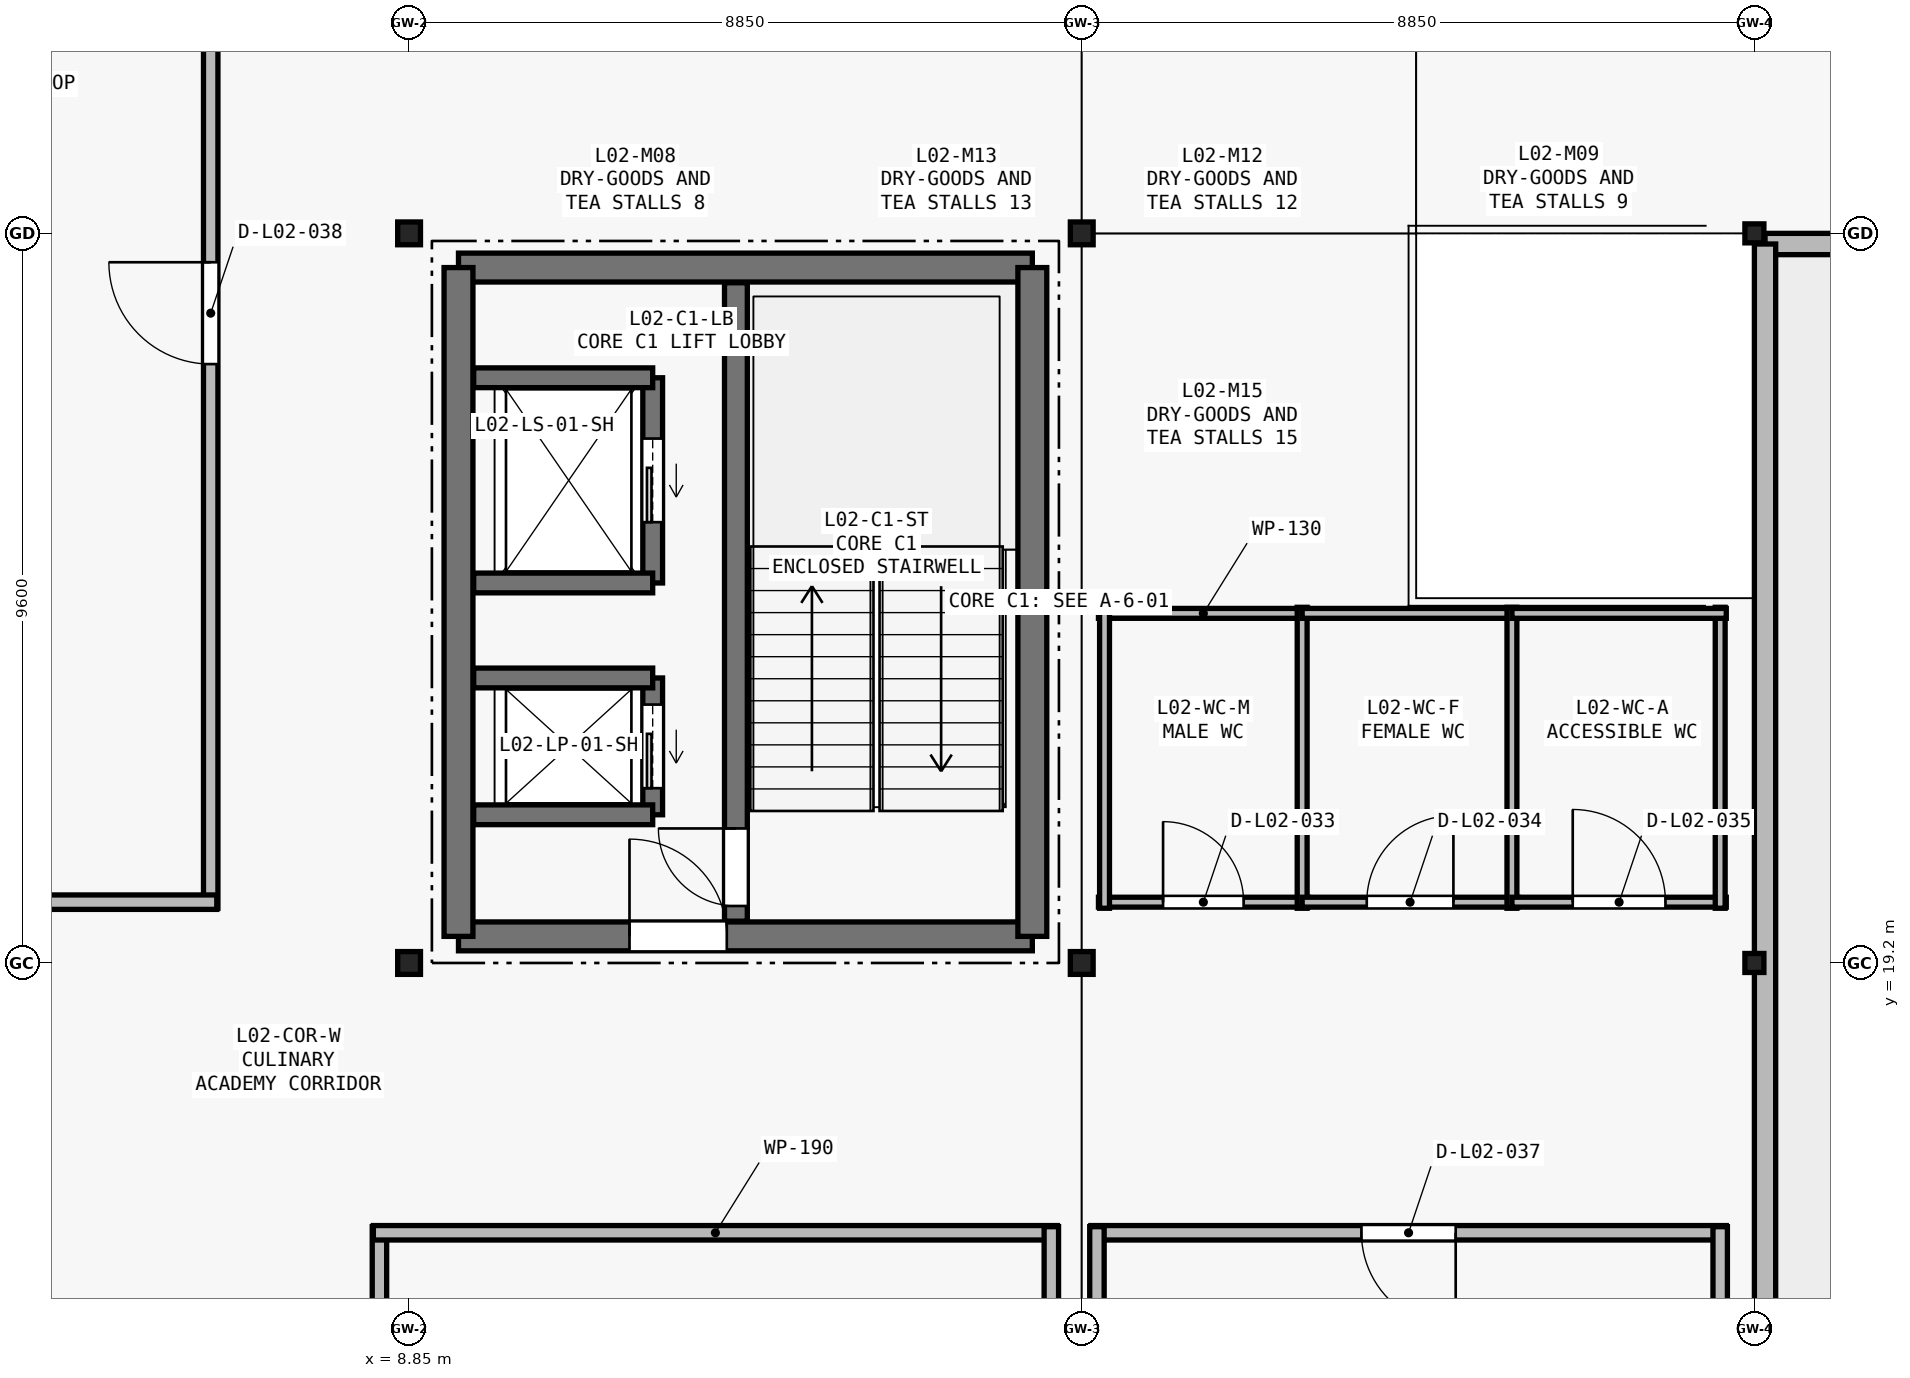
"""IFC4 building model, lengths in metres.
Left out: names, types, materials, properties, quantities, classifications, styles, units other than length and angle.
Written with IfcOpenShell. Run it as: python <this file> out.ifc"""

import sys

from ifc_helpers import new_model, si_unit, direction, frame, frame_2d, origin, origin_2d, place, context, subcontext, project, spatial, rectangle, i_section, extrude, element, fill, save


model = new_model("IFC4")
c1 = context("Model", 3, precision=1e-05, world=origin(), true_north=direction((0.0, 1.0)))
c2 = subcontext(c1, "Body", "Model", "MODEL_VIEW")
j1 = project(units=[si_unit("LENGTHUNIT", "METRE"), si_unit("PLANEANGLEUNIT", "RADIAN")], contexts=[c1])
p1 = place(None, origin())
s1 = spatial("IfcSite", under=j1, at=p1, CompositionType="ELEMENT")
p2 = place(p1, origin())
s2 = spatial("IfcBuilding", under=s1, at=p2, CompositionType="ELEMENT")
p3 = place(p2, frame((0.0, 0.0, 10.8)))
s3 = spatial("IfcBuildingStorey", under=s2, at=p3, CompositionType="ELEMENT", Elevation=10.8)
for number, where, z_axis, x_axis in (
    (1, (8.85, 19.2, 0.0), (0.0, 0.0, 1.0), (1.0, 0.0, 0.0)),
    (2, (8.85, 28.8, 0.0), (0.0, 0.0, 1.0), (1.0, 0.0, 0.0)),
    (3, (17.7, 19.2, 0.0), (0.0, 0.0, 1.0), (1.0, 0.0, 0.0)),
    (4, (17.7, 28.8, 0.0), (0.0, 0.0, 1.0), (1.0, 0.0, 0.0)),
):
    element("IfcColumn", number, at=place(p3, frame(where, z_axis=z_axis, x_axis=x_axis)), inside=s3, PredefinedType="COLUMN", context=c2, shape_type="SweptSolid", body=[
        extrude(i_section(OverallWidth=0.3, OverallDepth=0.3, WebThickness=0.01, FlangeThickness=0.015, FilletRadius=0.018, at=origin_2d()), origin(), (0.0, 0.0, 1.0), 4.2),
    ])
for number, where, z_axis, x_axis in (
    (5, (26.55, 19.2, 0.0), (0.0, 0.0, 1.0), (1.0, 0.0, 0.0)),
    (6, (26.55, 28.8, 0.0), (0.0, 0.0, 1.0), (1.0, 0.0, 0.0)),
):
    element("IfcColumn", number, at=place(p3, frame(where, z_axis=z_axis, x_axis=x_axis)), inside=s3, PredefinedType="COLUMN", context=c2, shape_type="SweptSolid", body=[
        extrude(i_section(OverallWidth=0.25, OverallDepth=0.25, WebThickness=0.009, FlangeThickness=0.014, FilletRadius=0.016, at=origin_2d()), origin(), (0.0, 0.0, 1.0), 4.2),
    ])
p4 = place(p3, frame((35.18, 28.66, 0.01), z_axis=(0.0, 0.0, 1.0), x_axis=(-1.0, 0.0, 0.0)))
e7 = element("IfcWall", 7, at=p4, inside=s3, PredefinedType="PARAPET", context=c2, shape_type="SweptSolid", body=[
    extrude(rectangle(XDim=8.49, YDim=0.28, at=frame_2d((4.245, 0.0))), origin(), (0.0, 0.0, 1.0), 1.15),
])
p5 = place(p3, frame((26.69, 28.66, 0.01), z_axis=(0.0, 0.0, 1.0), x_axis=(0.0, -1.0, 0.0)))
e8 = element("IfcWall", 8, at=p5, inside=s3, PredefinedType="PARAPET", context=c2, shape_type="SweptSolid", body=[
    extrude(rectangle(XDim=28.52, YDim=0.28, at=frame_2d((14.26, 0.0))), origin(), (0.0, 0.0, 1.0), 1.15),
])
p6 = place(p3, frame((9.5, 19.55, 0.0), z_axis=(0.0, 0.0, 1.0), x_axis=(1.0, 0.0, 0.0)))
e9 = element("IfcWall", 9, at=p6, inside=s3, PredefinedType="SHEAR", context=c2, shape_type="SweptSolid", body=[
    extrude(rectangle(XDim=7.55, YDim=0.38, at=frame_2d((3.775, 0.0))), origin(), (0.0, 0.0, 1.0), 4.2),
])
p7 = place(p6, frame((2.25, 0.0, 0.0)))
e10 = element("IfcOpeningElement", 10, at=p7, cuts=e9, PredefinedType="OPENING", context=c2, shape_type="SweptSolid", body=[
    extrude(rectangle(XDim=1.28, YDim=2.15, at=frame_2d((0.64, 1.075))), frame((0.0, 0.2, 0.0), z_axis=(0.0, -1.0, 0.0), x_axis=(1.0, 0.0, 0.0)), (0.0, 0.0, 1.0), 0.4),
])
p8 = place(p3, frame((17.05, 28.35, 0.0), z_axis=(0.0, 0.0, 1.0), x_axis=(-1.0, 0.0, 0.0)))
e11 = element("IfcWall", 11, at=p8, inside=s3, PredefinedType="SHEAR", context=c2, shape_type="SweptSolid", body=[
    extrude(rectangle(XDim=7.55, YDim=0.38, at=frame_2d((3.775, 0.0))), origin(), (0.0, 0.0, 1.0), 4.2),
])
for number, where, z_axis, x_axis in (
    (12, (9.5, 28.35, 0.0), (0.0, 0.0, 1.0), (0.0, -1.0, 0.0)),
    (13, (17.05, 19.55, 0.0), (0.0, 0.0, 1.0), (0.0, 1.0, 0.0)),
):
    element("IfcWall", number, at=place(p3, frame(where, z_axis=z_axis, x_axis=x_axis)), inside=s3, PredefinedType="SHEAR", context=c2, shape_type="SweptSolid", body=[
        extrude(rectangle(XDim=8.8, YDim=0.38, at=frame_2d((4.4, 0.0))), origin(), (0.0, 0.0, 1.0), 4.2),
    ])
p9 = place(p3, frame((13.15, 19.75, 0.0), z_axis=(0.0, 0.0, 1.0), x_axis=(0.0, 1.0, 0.0)))
e14 = element("IfcWall", 14, at=p9, inside=s3, PredefinedType="SHEAR", context=c2, shape_type="SweptSolid", body=[
    extrude(rectangle(XDim=8.4, YDim=0.3, at=frame_2d((4.2, 0.0))), origin(), (0.0, 0.0, 1.0), 4.2),
])
p10 = place(p9, frame((0.2, 0.0, 0.0)))
e15 = element("IfcOpeningElement", 15, at=p10, cuts=e14, PredefinedType="OPENING", context=c2, shape_type="SweptSolid", body=[
    extrude(rectangle(XDim=1.02, YDim=2.1, at=frame_2d((0.51, 1.05))), frame((0.0, 0.16, 0.0), z_axis=(0.0, -1.0, 0.0), x_axis=(1.0, 0.0, 0.0)), (0.0, 0.0, 1.0), 0.32),
])
p11 = place(p3, frame((12.055, 21.15, 0.0), z_axis=(0.0, 0.0, 1.0), x_axis=(0.0, 1.0, 0.0)))
e16 = element("IfcWall", 16, at=p11, inside=s3, PredefinedType="SHEAR", context=c2, shape_type="SweptSolid", body=[
    extrude(rectangle(XDim=1.8, YDim=0.26, at=frame_2d((0.9, 0.0))), origin(), (0.0, 0.0, 1.0), 4.2),
])
p12 = place(p11, frame((0.35, 0.0, 0.0)))
e17 = element("IfcOpeningElement", 17, at=p12, cuts=e16, PredefinedType="OPENING", context=c2, shape_type="SweptSolid", body=[
    extrude(rectangle(XDim=1.1, YDim=2.15, at=frame_2d((0.55, 1.075))), frame((0.0, 0.14, 0.0), z_axis=(0.0, -1.0, 0.0), x_axis=(1.0, 0.0, 0.0)), (0.0, 0.0, 1.0), 0.28),
])
for number, where, z_axis, x_axis in (
    (18, (9.7, 21.15, 0.0), (0.0, 0.0, 1.0), (1.0, 0.0, 0.0)),
    (19, (9.7, 22.95, 0.0), (0.0, 0.0, 1.0), (1.0, 0.0, 0.0)),
):
    element("IfcWall", number, at=place(p3, frame(where, z_axis=z_axis, x_axis=x_axis)), inside=s3, PredefinedType="SHEAR", context=c2, shape_type="SweptSolid", body=[
        extrude(rectangle(XDim=2.355, YDim=0.26, at=frame_2d((1.177, 0.0))), origin(), (0.0, 0.0, 1.0), 4.2),
    ])
p13 = place(p3, frame((12.055, 24.2, 0.0), z_axis=(0.0, 0.0, 1.0), x_axis=(0.0, 1.0, 0.0)))
e20 = element("IfcWall", 20, at=p13, inside=s3, PredefinedType="SHEAR", context=c2, shape_type="SweptSolid", body=[
    extrude(rectangle(XDim=2.7, YDim=0.26, at=frame_2d((1.35, 0.0))), origin(), (0.0, 0.0, 1.0), 4.2),
])
p14 = place(p13, frame((0.8, 0.0, 0.0)))
e21 = element("IfcOpeningElement", 21, at=p14, cuts=e20, PredefinedType="OPENING", context=c2, shape_type="SweptSolid", body=[
    extrude(rectangle(XDim=1.1, YDim=2.15, at=frame_2d((0.55, 1.075))), frame((0.0, 0.14, 0.0), z_axis=(0.0, -1.0, 0.0), x_axis=(1.0, 0.0, 0.0)), (0.0, 0.0, 1.0), 0.28),
])
for number, where, z_axis, x_axis in (
    (22, (9.7, 24.2, 0.0), (0.0, 0.0, 1.0), (1.0, 0.0, 0.0)),
    (23, (9.7, 26.9, 0.0), (0.0, 0.0, 1.0), (1.0, 0.0, 0.0)),
):
    element("IfcWall", number, at=place(p3, frame(where, z_axis=z_axis, x_axis=x_axis)), inside=s3, PredefinedType="SHEAR", context=c2, shape_type="SweptSolid", body=[
        extrude(rectangle(XDim=2.355, YDim=0.26, at=frame_2d((1.177, 0.0))), origin(), (0.0, 0.0, 1.0), 4.2),
    ])
p15 = place(p3, frame((17.92, 20.0, 0.0), z_axis=(0.0, 0.0, 1.0), x_axis=(1.0, 0.0, 0.0)))
e24 = element("IfcWall", 24, at=p15, inside=s3, PredefinedType="PARTITIONING", context=c2, shape_type="SweptSolid", body=[
    extrude(rectangle(XDim=2.76, YDim=0.13, at=frame_2d((1.38, 0.0))), origin(), (0.0, 0.0, 1.0), 3.72),
])
p16 = place(p15, frame((0.85, 0.0, 0.0)))
e25 = element("IfcOpeningElement", 25, at=p16, cuts=e24, PredefinedType="OPENING", context=c2, shape_type="SweptSolid", body=[
    extrude(rectangle(XDim=1.06, YDim=2.36, at=frame_2d((0.53, 1.18))), frame((0.0, 0.075, 0.0), z_axis=(0.0, -1.0, 0.0), x_axis=(1.0, 0.0, 0.0)), (0.0, 0.0, 1.0), 0.15),
])
p17 = place(p3, frame((20.68, 23.8, 0.0), z_axis=(0.0, 0.0, 1.0), x_axis=(-1.0, 0.0, 0.0)))
e26 = element("IfcWall", 26, at=p17, inside=s3, PredefinedType="PARTITIONING", context=c2, shape_type="SweptSolid", body=[
    extrude(rectangle(XDim=2.76, YDim=0.13, at=frame_2d((1.38, 0.0))), origin(), (0.0, 0.0, 1.0), 3.72),
])
p18 = place(p3, frame((20.6, 19.92, 0.0), z_axis=(0.0, 0.0, 1.0), x_axis=(0.0, 1.0, 0.0)))
e27 = element("IfcWall", 27, at=p18, inside=s3, PredefinedType="PARTITIONING", context=c2, shape_type="SweptSolid", body=[
    extrude(rectangle(XDim=3.96, YDim=0.13, at=frame_2d((1.98, 0.0))), origin(), (0.0, 0.0, 1.0), 3.565),
])
p19 = place(p3, frame((18.0, 23.88, 0.0), z_axis=(0.0, 0.0, 1.0), x_axis=(0.0, -1.0, 0.0)))
e28 = element("IfcWall", 28, at=p19, inside=s3, PredefinedType="PARTITIONING", context=c2, shape_type="SweptSolid", body=[
    extrude(rectangle(XDim=3.96, YDim=0.13, at=frame_2d((1.98, 0.0))), origin(), (0.0, 0.0, 1.0), 3.72),
])
p20 = place(p3, frame((20.6, 20.0, 0.0), z_axis=(0.0, 0.0, 1.0), x_axis=(1.0, 0.0, 0.0)))
e29 = element("IfcWall", 29, at=p20, inside=s3, PredefinedType="PARTITIONING", context=c2, shape_type="SweptSolid", body=[
    extrude(rectangle(XDim=2.84, YDim=0.13, at=frame_2d((1.42, 0.0))), origin(), (0.0, 0.0, 1.0), 3.72),
])
p21 = place(p20, frame((0.85, 0.0, 0.0)))
e30 = element("IfcOpeningElement", 30, at=p21, cuts=e29, PredefinedType="OPENING", context=c2, shape_type="SweptSolid", body=[
    extrude(rectangle(XDim=1.14, YDim=2.36, at=frame_2d((0.57, 1.18))), frame((0.0, 0.075, 0.0), z_axis=(0.0, -1.0, 0.0), x_axis=(1.0, 0.0, 0.0)), (0.0, 0.0, 1.0), 0.15),
])
p22 = place(p3, frame((23.44, 23.8, 0.0), z_axis=(0.0, 0.0, 1.0), x_axis=(-1.0, 0.0, 0.0)))
e31 = element("IfcWall", 31, at=p22, inside=s3, PredefinedType="PARTITIONING", context=c2, shape_type="SweptSolid", body=[
    extrude(rectangle(XDim=2.84, YDim=0.13, at=frame_2d((1.42, 0.0))), origin(), (0.0, 0.0, 1.0), 3.72),
])
p23 = place(p3, frame((23.36, 19.92, 0.0), z_axis=(0.0, 0.0, 1.0), x_axis=(0.0, 1.0, 0.0)))
e32 = element("IfcWall", 32, at=p23, inside=s3, PredefinedType="PARTITIONING", context=c2, shape_type="SweptSolid", body=[
    extrude(rectangle(XDim=3.96, YDim=0.13, at=frame_2d((1.98, 0.0))), origin(), (0.0, 0.0, 1.0), 3.72),
])
p24 = place(p3, frame((23.36, 20.0, 0.0), z_axis=(0.0, 0.0, 1.0), x_axis=(1.0, 0.0, 0.0)))
e33 = element("IfcWall", 33, at=p24, inside=s3, PredefinedType="PARTITIONING", context=c2, shape_type="SweptSolid", body=[
    extrude(rectangle(XDim=2.82, YDim=0.13, at=frame_2d((1.41, 0.0))), origin(), (0.0, 0.0, 1.0), 3.72),
])
p25 = place(p24, frame((0.8, 0.0, 0.0)))
e34 = element("IfcOpeningElement", 34, at=p25, cuts=e33, PredefinedType="OPENING", context=c2, shape_type="SweptSolid", body=[
    extrude(rectangle(XDim=1.22, YDim=2.36, at=frame_2d((0.61, 1.18))), frame((0.0, 0.075, 0.0), z_axis=(0.0, -1.0, 0.0), x_axis=(1.0, 0.0, 0.0)), (0.0, 0.0, 1.0), 0.15),
])
p26 = place(p3, frame((26.1, 19.92, 0.0), z_axis=(0.0, 0.0, 1.0), x_axis=(0.0, 1.0, 0.0)))
e35 = element("IfcWall", 35, at=p26, inside=s3, PredefinedType="PARTITIONING", context=c2, shape_type="SweptSolid", body=[
    extrude(rectangle(XDim=3.96, YDim=0.13, at=frame_2d((1.98, 0.0))), origin(), (0.0, 0.0, 1.0), 3.72),
])
p27 = place(p3, frame((26.18, 23.8, 0.0), z_axis=(0.0, 0.0, 1.0), x_axis=(-1.0, 0.0, 0.0)))
e36 = element("IfcWall", 36, at=p27, inside=s3, PredefinedType="PARTITIONING", context=c2, shape_type="SweptSolid", body=[
    extrude(rectangle(XDim=2.82, YDim=0.13, at=frame_2d((1.41, 0.0))), origin(), (0.0, 0.0, 1.0), 3.72),
])
p28 = place(p3, frame((8.46, 15.73, 0.0), z_axis=(0.0, 0.0, 1.0), x_axis=(0.0, -1.0, 0.0)))
e37 = element("IfcWall", 37, at=p28, inside=s3, PredefinedType="PARTITIONING", context=c2, shape_type="SweptSolid", body=[
    extrude(rectangle(XDim=15.53, YDim=0.19, at=frame_2d((7.765, 0.0))), origin(), (0.0, 0.0, 1.0), 3.72),
])
p29 = place(p28, frame((7.185, 0.0, 0.0)))
e38 = element("IfcOpeningElement", 38, at=p29, cuts=e37, PredefinedType="OPENING", context=c2, shape_type="SweptSolid", body=[
    extrude(rectangle(XDim=1.16, YDim=2.26, at=frame_2d((0.58, 1.13))), frame((0.0, 0.105, 0.0), z_axis=(0.0, -1.0, 0.0), x_axis=(1.0, 0.0, 0.0)), (0.0, 0.0, 1.0), 0.21),
])
p30 = place(p3, frame((17.38, 15.65, 0.0), z_axis=(0.0, 0.0, 1.0), x_axis=(-1.0, 0.0, 0.0)))
e39 = element("IfcWall", 39, at=p30, inside=s3, PredefinedType="PARTITIONING", context=c2, shape_type="SweptSolid", body=[
    extrude(rectangle(XDim=9.0, YDim=0.19, at=frame_2d((4.5, 0.0))), origin(), (0.0, 0.0, 1.0), 3.72),
])
p31 = place(p3, frame((17.3, 0.2, 0.0), z_axis=(0.0, 0.0, 1.0), x_axis=(0.0, 1.0, 0.0)))
e40 = element("IfcWall", 40, at=p31, inside=s3, PredefinedType="PARTITIONING", context=c2, shape_type="SweptSolid", body=[
    extrude(rectangle(XDim=15.53, YDim=0.19, at=frame_2d((7.765, 0.0))), origin(), (0.0, 0.0, 1.0), 3.72),
])
p32 = place(p3, frame((26.18, 15.65, 0.0), z_axis=(0.0, 0.0, 1.0), x_axis=(-1.0, 0.0, 0.0)))
e41 = element("IfcWall", 41, at=p32, inside=s3, PredefinedType="PARTITIONING", context=c2, shape_type="SweptSolid", body=[
    extrude(rectangle(XDim=8.36, YDim=0.19, at=frame_2d((4.18, 0.0))), origin(), (0.0, 0.0, 1.0), 3.72),
])
p33 = place(p32, frame((3.56, 0.0, 0.0)))
e42 = element("IfcOpeningElement", 42, at=p33, cuts=e41, PredefinedType="OPENING", context=c2, shape_type="SweptSolid", body=[
    extrude(rectangle(XDim=1.24, YDim=2.26, at=frame_2d((0.62, 1.13))), frame((0.0, 0.105, 0.0), z_axis=(0.0, -1.0, 0.0), x_axis=(1.0, 0.0, 0.0)), (0.0, 0.0, 1.0), 0.21),
])
p34 = place(p3, frame((17.9, 15.73, 0.0), z_axis=(0.0, 0.0, 1.0), x_axis=(0.0, -1.0, 0.0)))
e43 = element("IfcWall", 43, at=p34, inside=s3, PredefinedType="PARTITIONING", context=c2, shape_type="SweptSolid", body=[
    extrude(rectangle(XDim=15.31, YDim=0.19, at=frame_2d((7.655, 0.0))), origin(), (0.0, 0.0, 1.0), 3.415),
])
p35 = place(p3, frame((26.1, 0.2, 0.0), z_axis=(0.0, 0.0, 1.0), x_axis=(0.0, 1.0, 0.0)))
e44 = element("IfcWall", 44, at=p35, inside=s3, PredefinedType="PARTITIONING", context=c2, shape_type="SweptSolid", body=[
    extrude(rectangle(XDim=15.53, YDim=0.19, at=frame_2d((7.765, 0.0))), origin(), (0.0, 0.0, 1.0), 3.72),
])
p36 = place(p3, frame((6.24, 19.92, 0.0), z_axis=(0.0, 0.0, 1.0), x_axis=(0.0, 1.0, 0.0)))
e45 = element("IfcWall", 45, at=p36, inside=s3, PredefinedType="PARTITIONING", context=c2, shape_type="SweptSolid", body=[
    extrude(rectangle(XDim=15.66, YDim=0.19, at=frame_2d((7.83, 0.0))), origin(), (0.0, 0.0, 1.0), 3.72),
])
p37 = place(p36, frame((7.16, 0.0, 0.0)))
e46 = element("IfcOpeningElement", 46, at=p37, cuts=e45, PredefinedType="OPENING", context=c2, shape_type="SweptSolid", body=[
    extrude(rectangle(XDim=1.34, YDim=2.26, at=frame_2d((0.67, 1.13))), frame((0.0, 0.105, 0.0), z_axis=(0.0, -1.0, 0.0), x_axis=(1.0, 0.0, 0.0)), (0.0, 0.0, 1.0), 0.21),
])
p38 = place(p3, frame((0.2, 20.0, 0.0), z_axis=(0.0, 0.0, 1.0), x_axis=(1.0, 0.0, 0.0)))
e47 = element("IfcWall", 47, at=p38, inside=s3, PredefinedType="PARTITIONING", context=c2, shape_type="SweptSolid", body=[
    extrude(rectangle(XDim=6.12, YDim=0.19, at=frame_2d((3.06, 0.0))), origin(), (0.0, 0.0, 1.0), 3.72),
])
p39 = place(p7, origin())
e48 = element("IfcDoor", 48, at=p39, inside=s3, OperationType="SINGLE_SWING_LEFT", PredefinedType="DOOR", context=c2, shape_type="SweptSolid", body=[
    extrude(rectangle(XDim=1.28, YDim=2.15, at=frame_2d((0.64, 1.075))), frame((0.0, 0.025, 0.0), z_axis=(0.0, -1.0, 0.0), x_axis=(1.0, 0.0, 0.0)), (0.0, 0.0, 1.0), 0.05),
])
fill(e10, e48)
p40 = place(p10, origin())
e49 = element("IfcDoor", 49, at=p40, inside=s3, OperationType="SINGLE_SWING_RIGHT", PredefinedType="DOOR", context=c2, shape_type="SweptSolid", body=[
    extrude(rectangle(XDim=1.02, YDim=2.1, at=frame_2d((0.51, 1.05))), frame((0.0, 0.025, 0.0), z_axis=(0.0, -1.0, 0.0), x_axis=(1.0, 0.0, 0.0)), (0.0, 0.0, 1.0), 0.05),
])
fill(e15, e49)
p41 = place(p12, origin())
e50 = element("IfcDoor", 50, at=p41, inside=s3, OperationType="SLIDING_TO_LEFT", PredefinedType="DOOR", context=c2, shape_type="SweptSolid", body=[
    extrude(rectangle(XDim=1.1, YDim=2.15, at=frame_2d((0.55, 1.075))), frame((0.0, 0.025, 0.0), z_axis=(0.0, -1.0, 0.0), x_axis=(1.0, 0.0, 0.0)), (0.0, 0.0, 1.0), 0.05),
])
fill(e17, e50)
p42 = place(p14, origin())
e51 = element("IfcDoor", 51, at=p42, inside=s3, OperationType="SLIDING_TO_LEFT", PredefinedType="DOOR", context=c2, shape_type="SweptSolid", body=[
    extrude(rectangle(XDim=1.1, YDim=2.15, at=frame_2d((0.55, 1.075))), frame((0.0, 0.025, 0.0), z_axis=(0.0, -1.0, 0.0), x_axis=(1.0, 0.0, 0.0)), (0.0, 0.0, 1.0), 0.05),
])
fill(e21, e51)
p43 = place(p16, origin())
e52 = element("IfcDoor", 52, at=p43, inside=s3, OperationType="SINGLE_SWING_LEFT", PredefinedType="DOOR", context=c2, shape_type="SweptSolid", body=[
    extrude(rectangle(XDim=1.06, YDim=2.36, at=frame_2d((0.53, 1.18))), frame((0.0, 0.025, 0.0), z_axis=(0.0, -1.0, 0.0), x_axis=(1.0, 0.0, 0.0)), (0.0, 0.0, 1.0), 0.05),
])
fill(e25, e52)
p44 = place(p21, origin())
e53 = element("IfcDoor", 53, at=p44, inside=s3, OperationType="SINGLE_SWING_RIGHT", PredefinedType="DOOR", context=c2, shape_type="SweptSolid", body=[
    extrude(rectangle(XDim=1.14, YDim=2.36, at=frame_2d((0.57, 1.18))), frame((0.0, 0.025, 0.0), z_axis=(0.0, -1.0, 0.0), x_axis=(1.0, 0.0, 0.0)), (0.0, 0.0, 1.0), 0.05),
])
fill(e30, e53)
p45 = place(p25, origin())
e54 = element("IfcDoor", 54, at=p45, inside=s3, OperationType="SINGLE_SWING_LEFT", PredefinedType="DOOR", context=c2, shape_type="SweptSolid", body=[
    extrude(rectangle(XDim=1.22, YDim=2.36, at=frame_2d((0.61, 1.18))), frame((0.0, 0.025, 0.0), z_axis=(0.0, -1.0, 0.0), x_axis=(1.0, 0.0, 0.0)), (0.0, 0.0, 1.0), 0.05),
])
fill(e34, e54)
p46 = place(p33, origin())
e55 = element("IfcDoor", 55, at=p46, inside=s3, OperationType="SINGLE_SWING_LEFT", PredefinedType="DOOR", context=c2, shape_type="SweptSolid", body=[
    extrude(rectangle(XDim=1.24, YDim=2.26, at=frame_2d((0.62, 1.13))), frame((0.0, 0.025, 0.0), z_axis=(0.0, -1.0, 0.0), x_axis=(1.0, 0.0, 0.0)), (0.0, 0.0, 1.0), 0.05),
])
fill(e42, e55)
p47 = place(p37, origin())
e56 = element("IfcDoor", 56, at=p47, inside=s3, OperationType="SINGLE_SWING_RIGHT", PredefinedType="DOOR", context=c2, shape_type="SweptSolid", body=[
    extrude(rectangle(XDim=1.34, YDim=2.26, at=frame_2d((0.67, 1.13))), frame((0.0, 0.025, 0.0), z_axis=(0.0, -1.0, 0.0), x_axis=(1.0, 0.0, 0.0)), (0.0, 0.0, 1.0), 0.05),
])
fill(e46, e56)
save(model, sys.argv[1])
